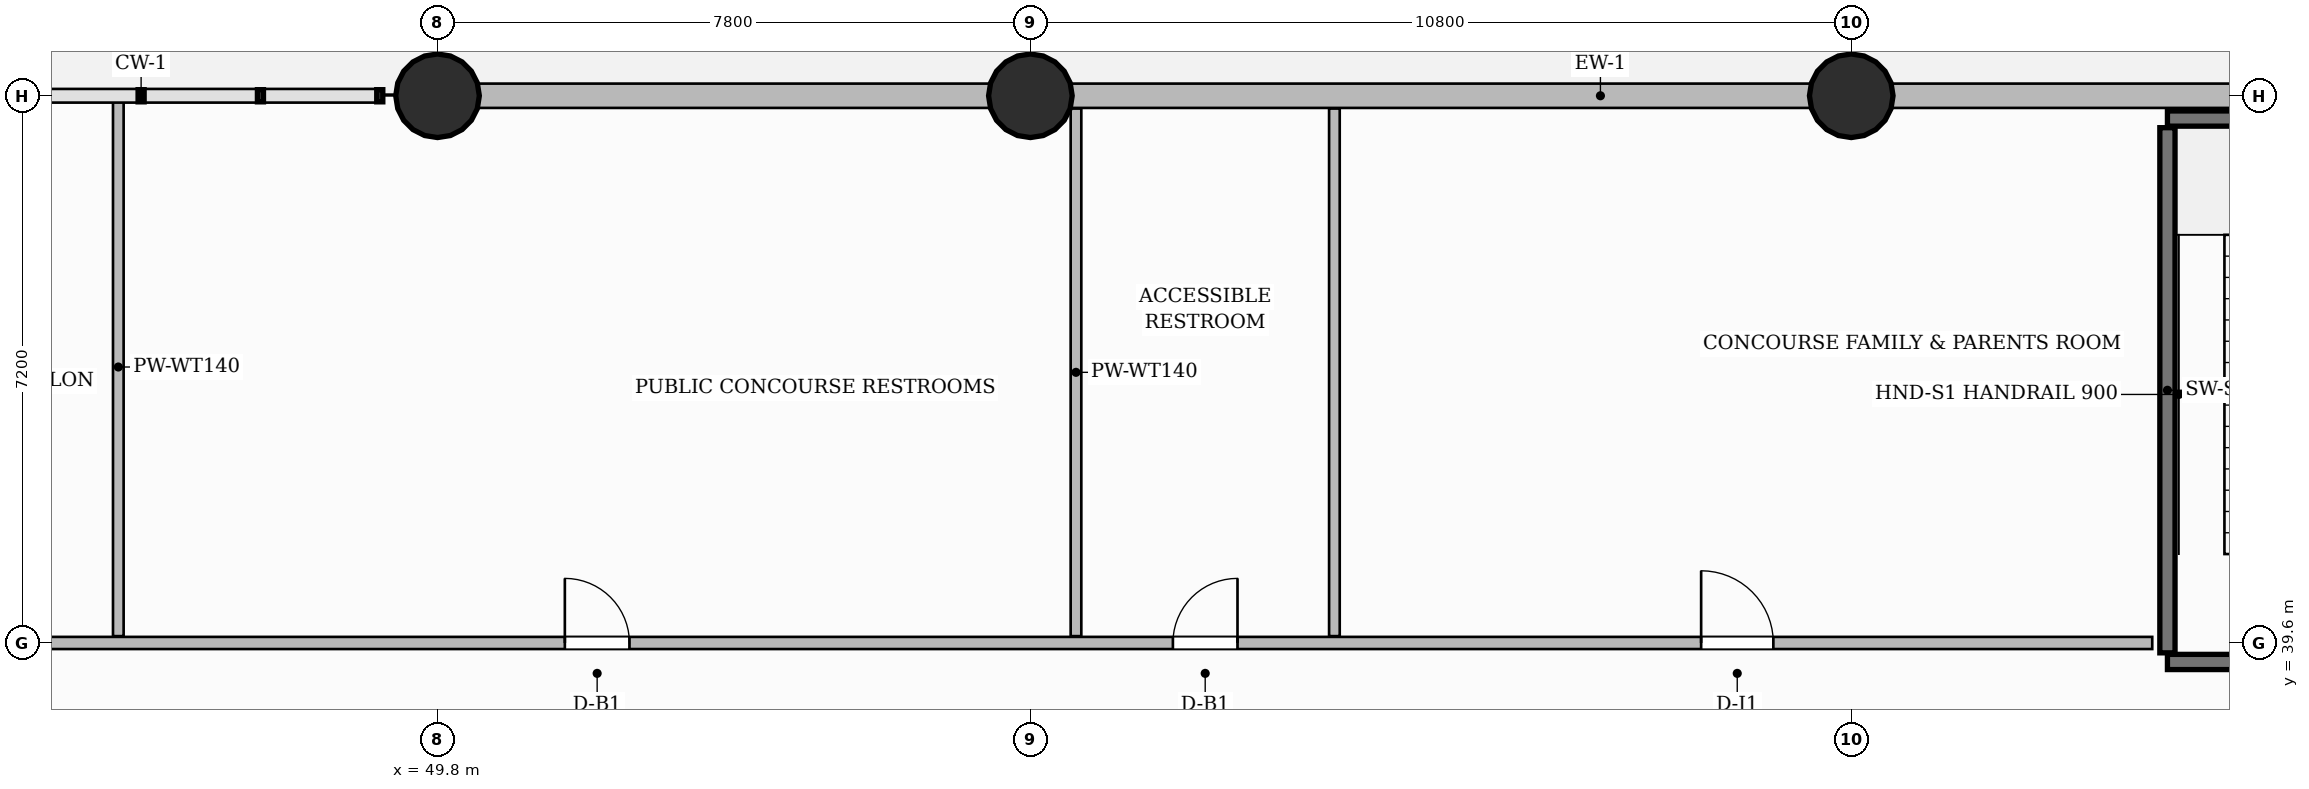
"""IFC4 building model, lengths in metres.
Left out: names, types, materials, properties, quantities, classifications, styles, units other than length and angle.
Written with IfcOpenShell. Run it as: python <this file> out.ifc"""

import sys

from ifc_helpers import new_model, si_unit, direction, frame, frame_2d, origin, origin_2d, place, context, subcontext, project, spatial, rectangle, circle, extrude, source, transform, mapped, element, fill, save


model = new_model("IFC4")
c1 = context("Model", 3, precision=1e-05, world=origin(), true_north=direction((0.0, 1.0)))
c2 = subcontext(c1, "Body", "Model", "MODEL_VIEW")
j1 = project(units=[si_unit("LENGTHUNIT", "METRE"), si_unit("PLANEANGLEUNIT", "RADIAN")], contexts=[c1])
p1 = place(None, origin())
s1 = spatial("IfcSite", under=j1, at=p1, CompositionType="ELEMENT")
p2 = place(p1, origin())
s2 = spatial("IfcBuilding", under=s1, at=p2, CompositionType="ELEMENT")
p3 = place(p2, origin())
s3 = spatial("IfcBuildingStorey", under=s2, at=p3, CompositionType="ELEMENT", Elevation=0.0)
m1 = source(origin(), c2, "Body", "SweptSolid", [
    extrude(circle(Radius=0.55, at=origin_2d()), origin(), (0.0, 0.0, 1.0), 5.4),
])
for number, where, z_axis, x_axis in (
    (1, (49.8, 46.8, 0.0), (0.0, 0.0, 1.0), (1.0, 0.0, 0.0)),
    (2, (57.6, 46.8, 0.0), (0.0, 0.0, 1.0), (1.0, 0.0, 0.0)),
    (3, (68.4, 46.8, 0.0), (0.0, 0.0, 1.0), (1.0, 0.0, 0.0)),
):
    element("IfcColumn", number, at=place(p3, frame(where, z_axis=z_axis, x_axis=x_axis)), inside=s3, PredefinedType="COLUMN", context=c2, shape_type="MappedRepresentation", body=[
        mapped(m1, transform((0.0, 0.0, 0.0), scale=1.0)),
    ])
p4 = place(p3, frame((72.56, 39.47, 0.0), z_axis=(0.0, 0.0, 1.0), x_axis=(0.0, 1.0, 0.0)))
e4 = element("IfcWall", 4, at=p4, inside=s3, PredefinedType="SHEAR", context=c2, shape_type="SweptSolid", body=[
    extrude(rectangle(XDim=6.91, YDim=0.2, at=frame_2d((3.455, 0.0))), origin(), (0.0, 0.0, 1.0), 5.4),
])
p5 = place(p3, frame((72.56, 46.5, 0.0), z_axis=(0.0, 0.0, 1.0), x_axis=(1.0, 0.0, 0.0)))
e5 = element("IfcWall", 5, at=p5, inside=s3, PredefinedType="SHEAR", context=c2, shape_type="SweptSolid", body=[
    extrude(rectangle(XDim=2.94, YDim=0.2, at=frame_2d((1.47, 0.0))), origin(), (0.0, 0.0, 1.0), 5.4),
])
p6 = place(p3, frame((72.56, 39.35, 0.0), z_axis=(0.0, 0.0, 1.0), x_axis=(1.0, 0.0, 0.0)))
e6 = element("IfcWall", 6, at=p6, inside=s3, PredefinedType="SHEAR", context=c2, shape_type="SweptSolid", body=[
    extrude(rectangle(XDim=2.94, YDim=0.2, at=frame_2d((1.47, 0.0))), origin(), (0.0, 0.0, 1.0), 5.4),
])
p7 = place(p6, frame((0.985, 0.0, 0.0)))
e7 = element("IfcOpeningElement", 7, at=p7, cuts=e6, PredefinedType="OPENING", context=c2, shape_type="SweptSolid", body=[
    extrude(rectangle(XDim=1.05, YDim=2.2, at=frame_2d((0.525, 1.1))), frame((0.0, 0.11, 0.0), z_axis=(0.0, -1.0, 0.0), x_axis=(1.0, 0.0, 0.0)), (0.0, 0.0, 1.0), 0.22),
])
p8 = place(p3, frame((28.64, 39.6, 0.0), z_axis=(0.0, 0.0, 1.0), x_axis=(1.0, 0.0, 0.0)))
e8 = element("IfcWall", 8, at=p8, inside=s3, PredefinedType="PARTITIONING", context=c2, shape_type="SweptSolid", body=[
    extrude(rectangle(XDim=43.72, YDim=0.16, at=frame_2d((21.86, 0.0))), origin(), (0.0, 0.0, 1.0), 4.085),
])
p9 = place(p8, frame((7.76, 0.0, 0.0)))
e9 = element("IfcOpeningElement", 9, at=p9, cuts=e8, PredefinedType="OPENING", context=c2, shape_type="SweptSolid", body=[
    extrude(rectangle(XDim=1.6, YDim=2.4, at=frame_2d((0.8, 1.2))), frame((0.0, 0.09, 0.0), z_axis=(0.0, -1.0, 0.0), x_axis=(1.0, 0.0, 0.0)), (0.0, 0.0, 1.0), 0.18),
])
p10 = place(p8, frame((22.835, 0.0, 0.0)))
e10 = element("IfcOpeningElement", 10, at=p10, cuts=e8, PredefinedType="OPENING", context=c2, shape_type="SweptSolid", body=[
    extrude(rectangle(XDim=0.85, YDim=2.1, at=frame_2d((0.425, 1.05))), frame((0.0, 0.09, 0.0), z_axis=(0.0, -1.0, 0.0), x_axis=(1.0, 0.0, 0.0)), (0.0, 0.0, 1.0), 0.18),
])
p11 = place(p8, frame((30.835, 0.0, 0.0)))
e11 = element("IfcOpeningElement", 11, at=p11, cuts=e8, PredefinedType="OPENING", context=c2, shape_type="SweptSolid", body=[
    extrude(rectangle(XDim=0.85, YDim=2.1, at=frame_2d((0.425, 1.05))), frame((0.0, 0.09, 0.0), z_axis=(0.0, -1.0, 0.0), x_axis=(1.0, 0.0, 0.0)), (0.0, 0.0, 1.0), 0.18),
])
p12 = place(p8, frame((37.785, 0.0, 0.0)))
e12 = element("IfcOpeningElement", 12, at=p12, cuts=e8, PredefinedType="OPENING", context=c2, shape_type="SweptSolid", body=[
    extrude(rectangle(XDim=0.95, YDim=2.15, at=frame_2d((0.475, 1.075))), frame((0.0, 0.09, 0.0), z_axis=(0.0, -1.0, 0.0), x_axis=(1.0, 0.0, 0.0)), (0.0, 0.0, 1.0), 0.18),
])
p13 = place(p3, frame((45.6, 39.69, 0.0), z_axis=(0.0, 0.0, 1.0), x_axis=(0.0, 1.0, 0.0)))
e13 = element("IfcWall", 13, at=p13, inside=s3, PredefinedType="PARTITIONING", context=c2, shape_type="SweptSolid", body=[
    extrude(rectangle(XDim=7.082, YDim=0.14, at=frame_2d((3.541, 0.0))), origin(), (0.0, 0.0, 1.0), 5.1),
])
for number, where, z_axis, x_axis in (
    (14, (58.2, 39.69, 0.0), (0.0, 0.0, 1.0), (0.0, 1.0, 0.0)),
    (15, (61.6, 39.69, 0.0), (0.0, 0.0, 1.0), (0.0, 1.0, 0.0)),
):
    element("IfcWall", number, at=place(p3, frame(where, z_axis=z_axis, x_axis=x_axis)), inside=s3, PredefinedType="PARTITIONING", context=c2, shape_type="SweptSolid", body=[
        extrude(rectangle(XDim=6.942, YDim=0.14, at=frame_2d((3.471, 0.0))), origin(), (0.0, 0.0, 1.0), 5.1),
    ])
p14 = place(p3, frame((49.8, 46.8, 0.0), z_axis=(0.0, 0.0, 1.0), x_axis=(1.0, 0.0, 0.0)))
e16 = element("IfcWall", 16, at=p14, inside=s3, PredefinedType="SOLIDWALL", context=c2, shape_type="SweptSolid", body=[
    extrude(rectangle(XDim=30.6, YDim=0.32, at=frame_2d((15.3, 0.0))), origin(), (0.0, 0.0, 1.0), 4.085),
])
m2 = source(origin(), c2, "Body", "SweptSolid", [
    extrude(rectangle(XDim=0.85, YDim=2.1, at=frame_2d((0.425, 1.05))), frame((0.0, 0.025, 0.0), z_axis=(0.0, -1.0, 0.0), x_axis=(1.0, 0.0, 0.0)), (0.0, 0.0, 1.0), 0.05),
])
p15 = place(p10, origin())
e17 = element("IfcDoor", 17, at=p15, inside=s3, OperationType="SINGLE_SWING_LEFT", PredefinedType="DOOR", context=c2, shape_type="MappedRepresentation", body=[
    mapped(m2, transform((0.0, 0.0, 0.0), scale=1.0)),
])
fill(e10, e17)
p16 = place(p11, origin())
e18 = element("IfcDoor", 18, at=p16, inside=s3, OperationType="SINGLE_SWING_RIGHT", PredefinedType="DOOR", context=c2, shape_type="MappedRepresentation", body=[
    mapped(m2, transform((0.0, 0.0, 0.0), scale=1.0)),
])
fill(e11, e18)
m3 = source(origin(), c2, "Body", "SweptSolid", [
    extrude(rectangle(XDim=0.95, YDim=2.15, at=frame_2d((0.475, 1.075))), frame((0.0, 0.025, 0.0), z_axis=(0.0, -1.0, 0.0), x_axis=(1.0, 0.0, 0.0)), (0.0, 0.0, 1.0), 0.05),
])
p17 = place(p12, origin())
e19 = element("IfcDoor", 19, at=p17, inside=s3, OperationType="SINGLE_SWING_LEFT", PredefinedType="DOOR", context=c2, shape_type="MappedRepresentation", body=[
    mapped(m3, transform((0.0, 0.0, 0.0), scale=1.0)),
])
fill(e12, e19)
save(model, sys.argv[1])
